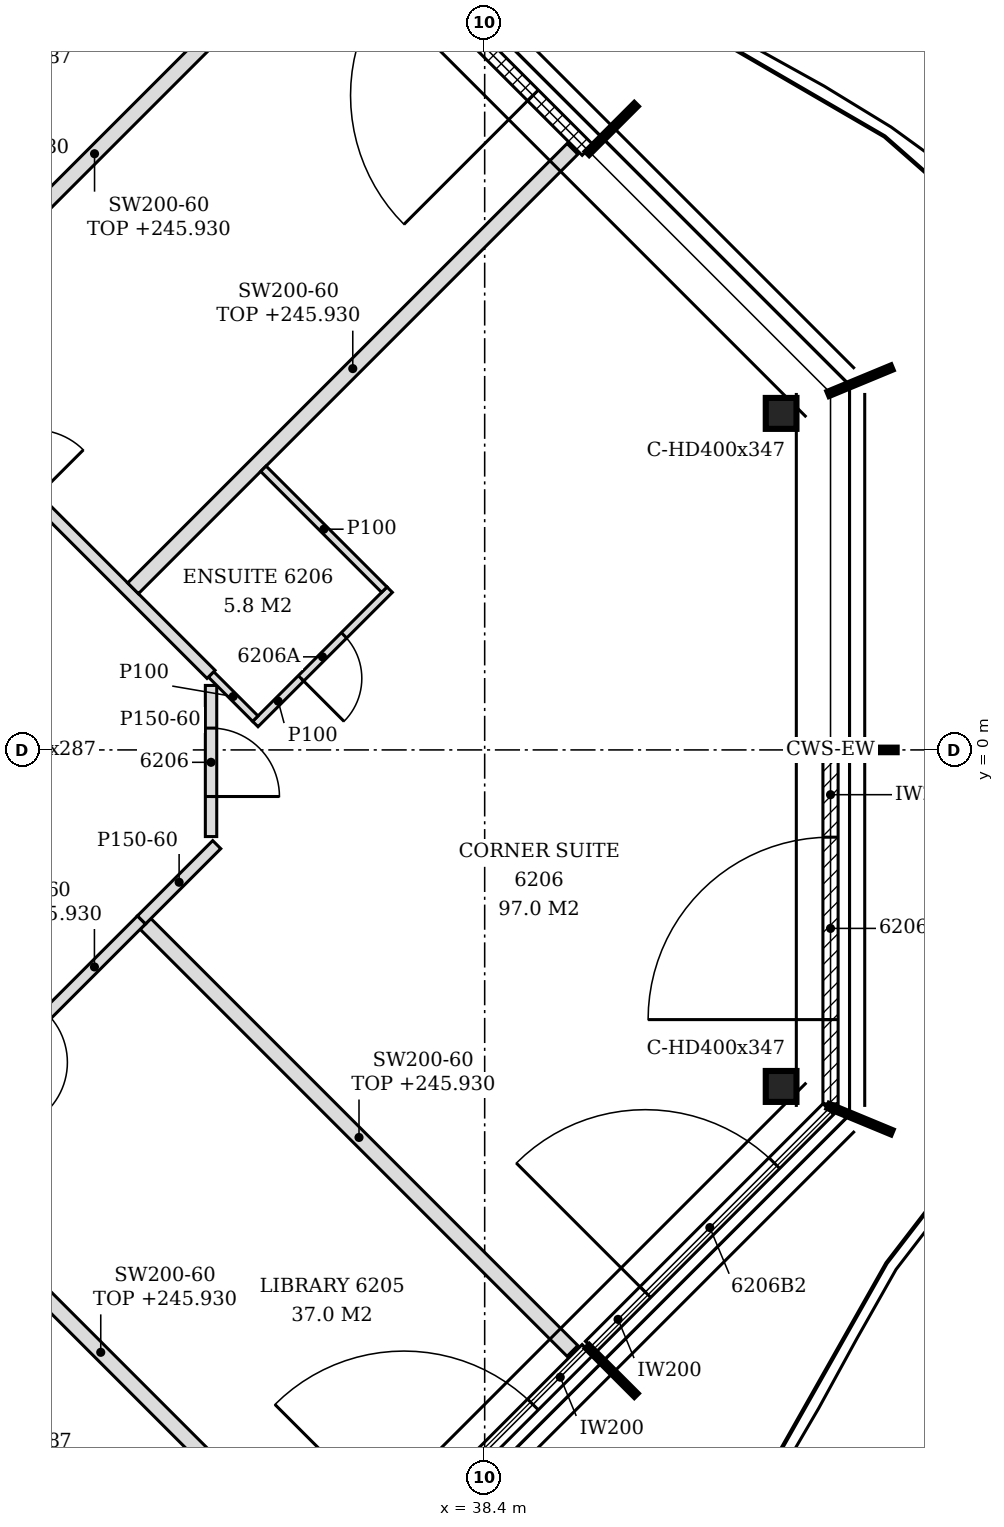
"""IFC4 building model, lengths in metres.
Left out: names, types, materials, properties, quantities, classifications, styles, units other than length and angle.
Written with IfcOpenShell. Run it as: python <this file> out.ifc"""

import sys

from ifc_helpers import new_model, si_unit, direction, frame, frame_2d, origin, origin_2d, place, context, subcontext, project, spatial, polyline, rectangle, i_section, outline, extrude, element, fill, save


model = new_model("IFC4")
c1 = context("Model", 3, precision=1e-05, world=origin(), true_north=direction((0.0, 1.0)))
c2 = subcontext(c1, "Body", "Model", "MODEL_VIEW")
j1 = project(units=[si_unit("LENGTHUNIT", "METRE"), si_unit("PLANEANGLEUNIT", "RADIAN")], contexts=[c1])
p1 = place(None, origin())
s1 = spatial("IfcSite", under=j1, at=p1, CompositionType="ELEMENT")
p2 = place(p1, origin())
s2 = spatial("IfcBuilding", under=s1, at=p2, CompositionType="ELEMENT")
p3 = place(p2, frame((0.0, 0.0, 243.0)))
s3 = spatial("IfcBuildingStorey", under=s2, at=p3, CompositionType="ELEMENT", Elevation=243.0)
for number, where, z_axis, x_axis in (
    (1, (42.3, -4.427, -0.15), (0.0, 0.0, 1.0), (1.0, 0.0, 0.0)),
    (2, (42.3, 4.427, -0.15), (0.0, 0.0, 1.0), (1.0, 0.0, 0.0)),
):
    element("IfcColumn", number, at=place(p3, frame(where, z_axis=z_axis, x_axis=x_axis)), inside=s3, PredefinedType="COLUMN", context=c2, shape_type="SweptSolid", body=[
        extrude(i_section(OverallWidth=0.404, OverallDepth=0.407, WebThickness=0.027, FlangeThickness=0.044, FilletRadius=0.015, at=origin_2d()), origin(), (0.0, 0.0, 1.0), 3.6),
    ])
p4 = place(p3, frame((36.62, -11.026, 0.0), z_axis=(0.0, 0.0, 1.0), x_axis=(0.707106781187, 0.707106781187, 0.0)))
e3 = element("IfcWall", 3, at=p4, inside=s3, PredefinedType="NOTDEFINED", context=c2, shape_type="SweptSolid", body=[
    extrude(rectangle(XDim=4.431, YDim=0.2, at=frame_2d((2.215, 0.0))), origin(), (0.0, 0.0, 1.0), 3.45),
])
p5 = place(p4, frame((1.015, 0.0, 0.0)))
e4 = element("IfcOpeningElement", 4, at=p5, cuts=e3, PredefinedType="OPENING", context=c2, shape_type="SweptSolid", body=[
    extrude(rectangle(XDim=2.4, YDim=2.4, at=frame_2d((1.2, 1.2))), frame((0.0, 0.11, 0.0), z_axis=(0.0, -1.0, 0.0), x_axis=(1.0, 0.0, 0.0)), (0.0, 0.0, 1.0), 0.22),
])
p6 = place(p3, frame((39.796, -7.851, 0.0), z_axis=(0.0, 0.0, 1.0), x_axis=(0.707079168996, 0.707134392299, 0.0)))
e5 = element("IfcWall", 5, at=p6, inside=s3, PredefinedType="NOTDEFINED", context=c2, shape_type="SweptSolid", body=[
    extrude(rectangle(XDim=4.421, YDim=0.2, at=frame_2d((2.21, 0.0))), origin(), (0.0, 0.0, 1.0), 3.45),
])
p7 = place(p6, frame((1.016, 0.0, 0.0)))
e6 = element("IfcOpeningElement", 6, at=p7, cuts=e5, PredefinedType="OPENING", context=c2, shape_type="SweptSolid", body=[
    extrude(rectangle(XDim=2.4, YDim=2.4, at=frame_2d((1.2, 1.2))), frame((0.0, 0.11, 0.0), z_axis=(0.0, -1.0, 0.0), x_axis=(1.0, 0.0, 0.0)), (0.0, 0.0, 1.0), 0.22),
])
p8 = place(p3, frame((42.95, -4.656, 0.0), z_axis=(0.0, 0.0, 1.0), x_axis=(0.0, 1.0, 0.0)))
e7 = element("IfcWall", 7, at=p8, inside=s3, PredefinedType="NOTDEFINED", context=c2, shape_type="SweptSolid", body=[
    extrude(rectangle(XDim=4.626, YDim=0.2, at=frame_2d((2.313, 0.0))), origin(), (0.0, 0.0, 1.0), 3.45),
])
p9 = place(p8, frame((1.108, 0.0, 0.0)))
e8 = element("IfcOpeningElement", 8, at=p9, cuts=e7, PredefinedType="OPENING", context=c2, shape_type="SweptSolid", body=[
    extrude(rectangle(XDim=2.4, YDim=2.4, at=frame_2d((1.2, 1.2))), frame((0.0, 0.11, 0.0), z_axis=(0.0, -1.0, 0.0), x_axis=(1.0, 0.0, 0.0)), (0.0, 0.0, 1.0), 0.22),
])
p10 = place(p3, frame((39.753, 7.893, 0.0), z_axis=(0.0, 0.0, 1.0), x_axis=(-0.707106781187, 0.707106781187, 0.0)))
e9 = element("IfcWall", 9, at=p10, inside=s3, PredefinedType="NOTDEFINED", context=c2, shape_type="SweptSolid", body=[
    extrude(rectangle(XDim=4.431, YDim=0.2, at=frame_2d((2.215, 0.0))), origin(), (0.0, 0.0, 1.0), 3.45),
])
p11 = place(p10, frame((1.015, 0.0, 0.0)))
e10 = element("IfcOpeningElement", 10, at=p11, cuts=e9, PredefinedType="OPENING", context=c2, shape_type="SweptSolid", body=[
    extrude(rectangle(XDim=2.4, YDim=2.4, at=frame_2d((1.2, 1.2))), frame((0.0, 0.11, 0.0), z_axis=(0.0, -1.0, 0.0), x_axis=(1.0, 0.0, 0.0)), (0.0, 0.0, 1.0), 0.22),
])
p12 = place(p3, frame((35.873, -10.449, 0.0), z_axis=(0.0, 0.0, 1.0), x_axis=(-0.707089680867, 0.707123881093, 0.0)))
e11 = element("IfcWall", 11, at=p12, inside=s3, PredefinedType="PARTITIONING", context=c2, shape_type="SweptSolid", body=[
    extrude(rectangle(XDim=7.139, YDim=0.2, at=frame_2d((3.569, 0.0))), origin(), (0.0, 0.0, 1.0), 2.93),
])
p13 = place(p3, frame((39.555, -7.907, 0.0), z_axis=(0.0, 0.0, 1.0), x_axis=(-0.707060685068, 0.7071528743, 0.0)))
e12 = element("IfcWall", 12, at=p13, inside=s3, PredefinedType="PARTITIONING", context=c2, shape_type="SweptSolid", body=[
    extrude(rectangle(XDim=7.945, YDim=0.2, at=frame_2d((3.972, 0.0))), origin(), (0.0, 0.0, 1.0), 2.93),
])
p14 = place(p3, frame((30.772, -5.348, 0.0), z_axis=(0.0, 0.0, 1.0), x_axis=(0.70724543229, 0.706968102891, 0.0)))
e13 = element("IfcWall", 13, at=p14, inside=s3, PredefinedType="PARTITIONING", context=c2, shape_type="SweptSolid", body=[
    extrude(rectangle(XDim=4.402, YDim=0.15, at=frame_2d((2.201, 0.0))), origin(), (0.0, 0.0, 1.0), 2.93),
])
p15 = place(p14, frame((1.751, 0.0, 0.0)))
e14 = element("IfcOpeningElement", 14, at=p15, cuts=e13, PredefinedType="OPENING", context=c2, shape_type="SweptSolid", body=[
    extrude(rectangle(XDim=0.9, YDim=2.1, at=frame_2d((0.45, 1.05))), frame((0.0, 0.085, 0.0), z_axis=(0.0, -1.0, 0.0), x_axis=(1.0, 0.0, 0.0)), (0.0, 0.0, 1.0), 0.17),
])
p16 = place(p3, frame((33.885, -2.236, 0.0), z_axis=(0.0, 0.0, 1.0), x_axis=(0.707106781187, 0.707106781187, 0.0)))
e15 = element("IfcWall", 15, at=p16, inside=s3, PredefinedType="PARTITIONING", context=c2, shape_type="SweptSolid", body=[
    extrude(rectangle(XDim=1.4, YDim=0.15, at=frame_2d((0.7, 0.0))), origin(), (0.0, 0.0, 1.0), 3.45),
])
p17 = place(p3, frame((34.8, -1.14, 0.0), z_axis=(0.0, 0.0, 1.0), x_axis=(0.0, 1.0, 0.0)))
e16 = element("IfcWall", 16, at=p17, inside=s3, PredefinedType="PARTITIONING", context=c2, shape_type="SweptSolid", body=[
    extrude(outline(polyline([(0.0, 0.0), (1.988, 0.0), (1.988, 3.45), (1.245, 3.45), (1.243, 2.88), (1.035, 2.88), (1.033, 3.45), (0.0, 3.45), (0.0, 0.0)])), frame((0.0, 0.075, 0.0), z_axis=(0.0, -1.0, 0.0), x_axis=(1.0, 0.0, 0.0)), (0.0, 0.0, 1.0), 0.15),
])
p18 = place(p17, frame((0.527, 0.0, 0.0)))
e17 = element("IfcOpeningElement", 17, at=p18, cuts=e16, PredefinedType="OPENING", context=c2, shape_type="SweptSolid", body=[
    extrude(rectangle(XDim=0.9, YDim=2.1, at=frame_2d((0.45, 1.05))), frame((0.0, 0.085, 0.0), z_axis=(0.0, -1.0, 0.0), x_axis=(1.0, 0.0, 0.0)), (0.0, 0.0, 1.0), 0.17),
])
p19 = place(p3, frame((35.383, 0.341, 0.0), z_axis=(0.0, 0.0, 1.0), x_axis=(0.707106781187, 0.707106781187, 0.0)))
e18 = element("IfcWall", 18, at=p19, inside=s3, PredefinedType="PARTITIONING", context=c2, shape_type="SweptSolid", body=[
    extrude(rectangle(XDim=2.5, YDim=0.1, at=frame_2d((1.25, 0.0))), origin(), (0.0, 0.0, 1.0), 3.45),
])
p20 = place(p19, frame((0.85, 0.0, 0.0)))
e19 = element("IfcOpeningElement", 19, at=p20, cuts=e18, PredefinedType="OPENING", context=c2, shape_type="SweptSolid", body=[
    extrude(rectangle(XDim=0.8, YDim=2.1, at=frame_2d((0.4, 1.05))), frame((0.0, 0.06, 0.0), z_axis=(0.0, -1.0, 0.0), x_axis=(1.0, 0.0, 0.0)), (0.0, 0.0, 1.0), 0.12),
])
p21 = place(p3, frame((35.383, 0.411, 0.0), z_axis=(0.0, 0.0, 1.0), x_axis=(-0.707106781187, 0.707106781187, 0.0)))
e20 = element("IfcWall", 20, at=p21, inside=s3, PredefinedType="PARTITIONING", context=c2, shape_type="SweptSolid", body=[
    extrude(rectangle(XDim=0.824, YDim=0.1, at=frame_2d((0.412, 0.0))), origin(), (0.0, 0.0, 1.0), 3.45),
])
p22 = place(p3, frame((34.8, 0.994, 0.0), z_axis=(0.0, 0.0, 1.0), x_axis=(-0.707099634543, 0.707113927758, 0.0)))
e21 = element("IfcWall", 21, at=p22, inside=s3, PredefinedType="PARTITIONING", context=c2, shape_type="SweptSolid", body=[
    extrude(rectangle(XDim=17.081, YDim=0.15, at=frame_2d((8.541, 0.0))), origin(), (0.0, 0.0, 1.0), 2.88),
])
p23 = place(p22, frame((3.276, 0.0, 0.0)))
e22 = element("IfcOpeningElement", 22, at=p23, cuts=e21, PredefinedType="OPENING", context=c2, shape_type="SweptSolid", body=[
    extrude(rectangle(XDim=0.9, YDim=2.1, at=frame_2d((0.45, 1.05))), frame((0.0, 0.085, 0.0), z_axis=(0.0, -1.0, 0.0), x_axis=(1.0, 0.0, 0.0)), (0.0, 0.0, 1.0), 0.17),
])
p24 = place(p22, frame((6.829, 0.0, 0.0)))
e23 = element("IfcOpeningElement", 23, at=p24, cuts=e21, PredefinedType="OPENING", context=c2, shape_type="SweptSolid", body=[
    extrude(rectangle(XDim=0.9, YDim=2.1, at=frame_2d((0.45, 1.05))), frame((0.0, 0.085, 0.0), z_axis=(0.0, -1.0, 0.0), x_axis=(1.0, 0.0, 0.0)), (0.0, 0.0, 1.0), 0.17),
])
p25 = place(p22, frame((11.23, 0.0, 0.0)))
e24 = element("IfcOpeningElement", 24, at=p25, cuts=e21, PredefinedType="OPENING", context=c2, shape_type="SweptSolid", body=[
    extrude(rectangle(XDim=0.9, YDim=2.1, at=frame_2d((0.45, 1.05))), frame((0.0, 0.085, 0.0), z_axis=(0.0, -1.0, 0.0), x_axis=(1.0, 0.0, 0.0)), (0.0, 0.0, 1.0), 0.17),
])
p26 = place(p3, frame((33.774, 2.126, 0.0), z_axis=(0.0, 0.0, 1.0), x_axis=(0.707121711178, 0.70709185088, 0.0)))
e25 = element("IfcWall", 25, at=p26, inside=s3, PredefinedType="PARTITIONING", context=c2, shape_type="SweptSolid", body=[
    extrude(rectangle(XDim=8.176, YDim=0.2, at=frame_2d((4.088, 0.0))), origin(), (0.0, 0.0, 1.0), 2.93),
])
p27 = place(p3, frame((37.08, 2.108, 0.0), z_axis=(0.0, 0.0, 1.0), x_axis=(-0.707106781187, 0.707106781187, 0.0)))
e26 = element("IfcWall", 26, at=p27, inside=s3, PredefinedType="PARTITIONING", context=c2, shape_type="SweptSolid", body=[
    extrude(rectangle(XDim=2.25, YDim=0.1, at=frame_2d((1.125, 0.0))), origin(), (0.0, 0.0, 1.0), 3.45),
])
p28 = place(p3, frame((30.662, 5.238, 0.0), z_axis=(0.0, 0.0, 1.0), x_axis=(0.707106781187, 0.707106781187, 0.0)))
e27 = element("IfcWall", 27, at=p28, inside=s3, PredefinedType="PARTITIONING", context=c2, shape_type="SweptSolid", body=[
    extrude(rectangle(XDim=7.369, YDim=0.2, at=frame_2d((3.685, 0.0))), origin(), (0.0, 0.0, 1.0), 2.93),
])
p29 = place(p5, origin())
e28 = element("IfcDoor", 28, at=p29, inside=s3, OperationType="SINGLE_SWING_LEFT", PredefinedType="DOOR", context=c2, shape_type="SweptSolid", body=[
    extrude(rectangle(XDim=2.4, YDim=2.4, at=frame_2d((1.2, 1.2))), frame((0.0, 0.025, 0.0), z_axis=(0.0, -1.0, 0.0), x_axis=(1.0, 0.0, 0.0)), (0.0, 0.0, 1.0), 0.05),
])
fill(e4, e28)
p30 = place(p7, origin())
e29 = element("IfcDoor", 29, at=p30, inside=s3, OperationType="SINGLE_SWING_LEFT", PredefinedType="DOOR", context=c2, shape_type="SweptSolid", body=[
    extrude(rectangle(XDim=2.4, YDim=2.4, at=frame_2d((1.2, 1.2))), frame((0.0, 0.025, 0.0), z_axis=(0.0, -1.0, 0.0), x_axis=(1.0, 0.0, 0.0)), (0.0, 0.0, 1.0), 0.05),
])
fill(e6, e29)
p31 = place(p9, origin())
e30 = element("IfcDoor", 30, at=p31, inside=s3, OperationType="SINGLE_SWING_LEFT", PredefinedType="DOOR", context=c2, shape_type="SweptSolid", body=[
    extrude(rectangle(XDim=2.4, YDim=2.4, at=frame_2d((1.2, 1.2))), frame((0.0, 0.025, 0.0), z_axis=(0.0, -1.0, 0.0), x_axis=(1.0, 0.0, 0.0)), (0.0, 0.0, 1.0), 0.05),
])
fill(e8, e30)
p32 = place(p11, origin())
e31 = element("IfcDoor", 31, at=p32, inside=s3, OperationType="SINGLE_SWING_LEFT", PredefinedType="DOOR", context=c2, shape_type="SweptSolid", body=[
    extrude(rectangle(XDim=2.4, YDim=2.4, at=frame_2d((1.2, 1.2))), frame((0.0, 0.025, 0.0), z_axis=(0.0, -1.0, 0.0), x_axis=(1.0, 0.0, 0.0)), (0.0, 0.0, 1.0), 0.05),
])
fill(e10, e31)
p33 = place(p18, frame((0.9, 0.0, 0.0), z_axis=(0.0, 0.0, 1.0), x_axis=(-1.0, 0.0, 0.0)))
e32 = element("IfcDoor", 32, at=p33, inside=s3, OperationType="SINGLE_SWING_RIGHT", PredefinedType="DOOR", context=c2, shape_type="SweptSolid", body=[
    extrude(rectangle(XDim=0.9, YDim=2.1, at=frame_2d((0.45, 1.05))), frame((0.0, 0.025, 0.0), z_axis=(0.0, -1.0, 0.0), x_axis=(1.0, 0.0, 0.0)), (0.0, 0.0, 1.0), 0.05),
])
fill(e17, e32)
p34 = place(p20, frame((0.8, 0.0, 0.0), z_axis=(0.0, 0.0, 1.0), x_axis=(-1.0, 0.0, 0.0)))
e33 = element("IfcDoor", 33, at=p34, inside=s3, OperationType="SINGLE_SWING_RIGHT", PredefinedType="DOOR", context=c2, shape_type="SweptSolid", body=[
    extrude(rectangle(XDim=0.8, YDim=2.1, at=frame_2d((0.4, 1.05))), frame((0.0, 0.025, 0.0), z_axis=(0.0, -1.0, 0.0), x_axis=(1.0, 0.0, 0.0)), (0.0, 0.0, 1.0), 0.05),
])
fill(e19, e33)
save(model, sys.argv[1])
